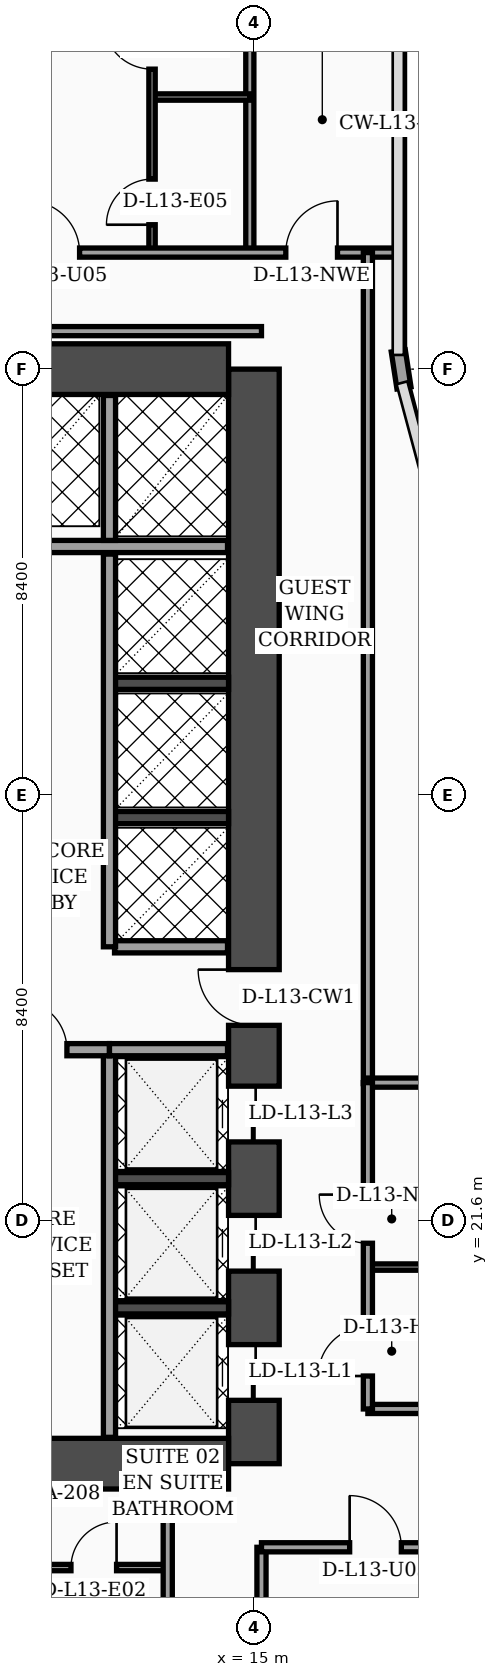
"""IFC4 building model, lengths in metres.
Left out: names, types, materials, properties, quantities, classifications, styles, units other than length and angle.
Written with IfcOpenShell. Run it as: python <this file> out.ifc"""

import sys

from ifc_helpers import new_model, si_unit, direction, frame, frame_2d, origin, place, context, subcontext, project, spatial, rectangle, extrude, element, fill, save


model = new_model("IFC4")
c1 = context("Model", 3, precision=1e-05, world=origin(), true_north=direction((0.0, 1.0)))
c2 = subcontext(c1, "Body", "Model", "MODEL_VIEW")
j1 = project(units=[si_unit("LENGTHUNIT", "METRE"), si_unit("PLANEANGLEUNIT", "RADIAN")], contexts=[c1])
p1 = place(None, origin())
s1 = spatial("IfcSite", under=j1, at=p1, CompositionType="ELEMENT")
p2 = place(p1, origin())
s2 = spatial("IfcBuilding", under=s1, at=p2, CompositionType="ELEMENT")
p3 = place(p2, frame((0.0, 0.0, 58.4)))
s3 = spatial("IfcBuildingStorey", under=s2, at=p3, CompositionType="ELEMENT", Elevation=58.4)
p4 = place(p3, frame((15.0, 16.8, 0.0), z_axis=(0.0, 0.0, 1.0), x_axis=(0.0, 1.0, 0.0)))
e1 = element("IfcWall", 1, at=p4, inside=s3, PredefinedType="SHEAR", context=c2, shape_type="SweptSolid", body=[
    extrude(rectangle(XDim=21.6, YDim=1.0, at=frame_2d((10.8, 0.0))), origin(), (0.0, 0.0, 1.0), 3.56),
])
p5 = place(p4, frame((8.65, 0.0, 0.0)))
e2 = element("IfcOpeningElement", 2, at=p5, cuts=e1, PredefinedType="OPENING", context=c2, shape_type="SweptSolid", body=[
    extrude(rectangle(XDim=1.1, YDim=2.2, at=frame_2d((0.55, 1.1))), frame((0.0, 0.51, 0.0), z_axis=(0.0, -1.0, 0.0), x_axis=(1.0, 0.0, 0.0)), (0.0, 0.0, 1.0), 1.02),
])
p6 = place(p4, frame((1.25, 0.0, 0.0)))
e3 = element("IfcOpeningElement", 3, at=p6, cuts=e1, PredefinedType="OPENING", context=c2, shape_type="SweptSolid", body=[
    extrude(rectangle(XDim=1.1, YDim=2.2, at=frame_2d((0.55, 1.1))), frame((0.0, 0.51, 0.0), z_axis=(0.0, -1.0, 0.0), x_axis=(1.0, 0.0, 0.0)), (0.0, 0.0, 1.0), 1.02),
])
p7 = place(p4, frame((3.8, 0.0, 0.0)))
e4 = element("IfcOpeningElement", 4, at=p7, cuts=e1, PredefinedType="OPENING", context=c2, shape_type="SweptSolid", body=[
    extrude(rectangle(XDim=1.1, YDim=2.2, at=frame_2d((0.55, 1.1))), frame((0.0, 0.51, 0.0), z_axis=(0.0, -1.0, 0.0), x_axis=(1.0, 0.0, 0.0)), (0.0, 0.0, 1.0), 1.02),
])
p8 = place(p4, frame((6.35, 0.0, 0.0)))
e5 = element("IfcOpeningElement", 5, at=p8, cuts=e1, PredefinedType="OPENING", context=c2, shape_type="SweptSolid", body=[
    extrude(rectangle(XDim=1.1, YDim=2.2, at=frame_2d((0.55, 1.1))), frame((0.0, 0.51, 0.0), z_axis=(0.0, -1.0, 0.0), x_axis=(1.0, 0.0, 0.0)), (0.0, 0.0, 1.0), 1.02),
])
for number, where, z_axis, x_axis in (
    (6, (4.7, 38.4, 0.0), (0.0, 0.0, 1.0), (1.0, 0.0, 0.0)),
    (7, (4.7, 16.8, 0.0), (0.0, 0.0, 1.0), (1.0, 0.0, 0.0)),
):
    element("IfcWall", number, at=place(p3, frame(where, z_axis=z_axis, x_axis=x_axis)), inside=s3, PredefinedType="SHEAR", context=c2, shape_type="SweptSolid", body=[
        extrude(rectangle(XDim=9.8, YDim=1.0, at=frame_2d((4.9, 0.0))), origin(), (0.0, 0.0, 1.0), 3.56),
    ])
for number, where, z_axis, x_axis in (
    (8, (12.18, 19.875, 0.0), (0.0, 0.0, 1.0), (1.0, 0.0, 0.0)),
    (9, (12.18, 22.425, 0.0), (0.0, 0.0, 1.0), (1.0, 0.0, 0.0)),
    (10, (12.18, 29.55, 0.0), (0.0, 0.0, 1.0), (1.0, 0.0, 0.0)),
    (11, (12.18, 32.2, 0.0), (0.0, 0.0, 1.0), (1.0, 0.0, 0.0)),
):
    element("IfcWall", number, at=place(p3, frame(where, z_axis=z_axis, x_axis=x_axis)), inside=s3, PredefinedType="SOLIDWALL", context=c2, shape_type="SweptSolid", body=[
        extrude(rectangle(XDim=2.32, YDim=0.24, at=frame_2d((1.16, 0.0))), origin(), (0.0, 0.0, 1.0), 3.56),
    ])
p9 = place(p3, frame((17.962, 38.03, 0.0), z_axis=(0.0, 0.0, 1.0), x_axis=(-0.15141125477, 0.988470855377, 0.0)))
e12 = element("IfcWall", 12, at=p9, inside=s3, PredefinedType="SOLIDWALL", context=c2, shape_type="SweptSolid", body=[
    extrude(rectangle(XDim=0.739, YDim=0.28, at=frame_2d((0.369, 0.0))), origin(), (0.0, 0.0, 1.0), 3.56),
])
p10 = place(p3, frame((12.15, 17.32, 0.0), z_axis=(0.0, 0.0, 1.0), x_axis=(0.0, 1.0, 0.0)))
e13 = element("IfcWall", 13, at=p10, inside=s3, PredefinedType="SOLIDWALL", context=c2, shape_type="SweptSolid", body=[
    extrude(rectangle(XDim=7.65, YDim=0.24, at=frame_2d((3.825, 0.0))), origin(), (0.0, 0.0, 1.0), 3.56),
])
p11 = place(p3, frame((9.68, 24.97, 0.0), z_axis=(0.0, 0.0, 1.0), x_axis=(1.0, 0.0, 0.0)))
e14 = element("IfcWall", 14, at=p11, inside=s3, PredefinedType="SOLIDWALL", context=c2, shape_type="SweptSolid", body=[
    extrude(rectangle(XDim=2.47, YDim=0.24, at=frame_2d((1.235, 0.0))), origin(), (0.0, 0.0, 1.0), 3.56),
])
p12 = place(p11, frame((0.65, 0.0, 0.0)))
e15 = element("IfcOpeningElement", 15, at=p12, cuts=e14, PredefinedType="OPENING", context=c2, shape_type="SweptSolid", body=[
    extrude(rectangle(XDim=0.98, YDim=2.15, at=frame_2d((0.49, 1.075))), frame((0.0, 0.13, 0.0), z_axis=(0.0, -1.0, 0.0), x_axis=(1.0, 0.0, 0.0)), (0.0, 0.0, 1.0), 0.26),
])
p13 = place(p3, frame((12.15, 24.97, 0.0), z_axis=(0.0, 0.0, 1.0), x_axis=(1.0, 0.0, 0.0)))
e16 = element("IfcWall", 16, at=p13, inside=s3, PredefinedType="SOLIDWALL", context=c2, shape_type="SweptSolid", body=[
    extrude(rectangle(XDim=2.33, YDim=0.24, at=frame_2d((1.165, 0.0))), origin(), (0.0, 0.0, 1.0), 2.84),
])
p14 = place(p3, frame((12.25, 27.0, 0.0), z_axis=(0.0, 0.0, 1.0), x_axis=(1.0, 0.0, 0.0)))
e17 = element("IfcWall", 17, at=p14, inside=s3, PredefinedType="SOLIDWALL", context=c2, shape_type="SweptSolid", body=[
    extrude(rectangle(XDim=2.23, YDim=0.24, at=frame_2d((1.115, 0.0))), origin(), (0.0, 0.0, 1.0), 3.56),
])
p15 = place(p3, frame((12.15, 27.0, 0.0), z_axis=(0.0, 0.0, 1.0), x_axis=(0.0, 1.0, 0.0)))
e18 = element("IfcWall", 18, at=p15, inside=s3, PredefinedType="SOLIDWALL", context=c2, shape_type="SweptSolid", body=[
    extrude(rectangle(XDim=7.75, YDim=0.24, at=frame_2d((3.875, 0.0))), origin(), (0.0, 0.0, 1.0), 3.56),
])
p16 = place(p3, frame((9.66, 34.9, 0.0), z_axis=(0.0, 0.0, 1.0), x_axis=(1.0, 0.0, 0.0)))
e19 = element("IfcWall", 19, at=p16, inside=s3, PredefinedType="SOLIDWALL", context=c2, shape_type="SweptSolid", body=[
    extrude(rectangle(XDim=4.82, YDim=0.24, at=frame_2d((2.41, 0.0))), origin(), (0.0, 0.0, 1.0), 3.56),
])
p17 = place(p3, frame((12.15, 35.02, 0.0), z_axis=(0.0, 0.0, 1.0), x_axis=(0.0, 1.0, 0.0)))
e20 = element("IfcWall", 20, at=p17, inside=s3, PredefinedType="SOLIDWALL", context=c2, shape_type="SweptSolid", body=[
    extrude(rectangle(XDim=2.86, YDim=0.24, at=frame_2d((1.43, 0.0))), origin(), (0.0, 0.0, 1.0), 3.56),
])
p18 = place(p3, frame((0.08, 14.75, 0.0), z_axis=(0.0, 0.0, 1.0), x_axis=(1.0, 0.0, 0.0)))
e21 = element("IfcWall", 21, at=p18, inside=s3, PredefinedType="PARTITIONING", context=c2, shape_type="SweptSolid", body=[
    extrude(rectangle(XDim=13.22, YDim=0.125, at=frame_2d((6.61, 0.0))), origin(), (0.0, 0.0, 1.0), 2.84),
])
p19 = place(p18, frame((4.67, 0.0, 0.0)))
e22 = element("IfcOpeningElement", 22, at=p19, cuts=e21, PredefinedType="OPENING", context=c2, shape_type="SweptSolid", body=[
    extrude(rectangle(XDim=0.96, YDim=2.2, at=frame_2d((0.48, 1.1))), frame((0.0, 0.073, 0.0), z_axis=(0.0, -1.0, 0.0), x_axis=(1.0, 0.0, 0.0)), (0.0, 0.0, 1.0), 0.145),
])
p20 = place(p18, frame((11.31, 0.0, 0.0)))
e23 = element("IfcOpeningElement", 23, at=p20, cuts=e21, PredefinedType="OPENING", context=c2, shape_type="SweptSolid", body=[
    extrude(rectangle(XDim=0.9, YDim=2.15, at=frame_2d((0.45, 1.075))), frame((0.0, 0.073, 0.0), z_axis=(0.0, -1.0, 0.0), x_axis=(1.0, 0.0, 0.0)), (0.0, 0.0, 1.0), 0.145),
])
p21 = place(p3, frame((13.3, 2.44, 0.0), z_axis=(0.0, 0.0, 1.0), x_axis=(0.0, 1.0, 0.0)))
e24 = element("IfcWall", 24, at=p21, inside=s3, PredefinedType="PARTITIONING", context=c2, shape_type="SweptSolid", body=[
    extrude(rectangle(XDim=14.36, YDim=0.18, at=frame_2d((7.18, 0.0))), origin(), (0.0, 0.0, 1.0), 3.04),
])
p22 = place(p21, frame((3.01, 0.0, 0.0)))
e25 = element("IfcOpeningElement", 25, at=p22, cuts=e24, PredefinedType="OPENING", context=c2, shape_type="SweptSolid", body=[
    extrude(rectangle(XDim=1.02, YDim=2.2, at=frame_2d((0.51, 1.1))), frame((0.0, 0.1, 0.0), z_axis=(0.0, -1.0, 0.0), x_axis=(1.0, 0.0, 0.0)), (0.0, 0.0, 1.0), 0.2),
])
p23 = place(p21, frame((9.35, 0.0, 0.0)))
e26 = element("IfcOpeningElement", 26, at=p23, cuts=e24, PredefinedType="OPENING", context=c2, shape_type="SweptSolid", body=[
    extrude(rectangle(XDim=1.02, YDim=2.2, at=frame_2d((0.51, 1.1))), frame((0.0, 0.1, 0.0), z_axis=(0.0, -1.0, 0.0), x_axis=(1.0, 0.0, 0.0)), (0.0, 0.0, 1.0), 0.2),
])
p24 = place(p3, frame((15.15, 2.44, 0.0), z_axis=(0.0, 0.0, 1.0), x_axis=(0.0, 1.0, 0.0)))
e27 = element("IfcWall", 27, at=p24, inside=s3, PredefinedType="PARTITIONING", context=c2, shape_type="SweptSolid", body=[
    extrude(rectangle(XDim=12.71, YDim=0.18, at=frame_2d((6.355, 0.0))), origin(), (0.0, 0.0, 1.0), 3.04),
])
p25 = place(p3, frame((15.15, 15.15, 0.0), z_axis=(0.0, 0.0, 1.0), x_axis=(1.0, 0.0, 0.0)))
e28 = element("IfcWall", 28, at=p25, inside=s3, PredefinedType="PARTITIONING", context=c2, shape_type="SweptSolid", body=[
    extrude(rectangle(XDim=6.45, YDim=0.18, at=frame_2d((3.225, 0.0))), origin(), (0.0, 0.0, 1.0), 2.34),
])
p26 = place(p25, frame((1.74, 0.0, 0.0)))
e29 = element("IfcOpeningElement", 29, at=p26, cuts=e28, PredefinedType="OPENING", context=c2, shape_type="SweptSolid", body=[
    extrude(rectangle(XDim=1.02, YDim=2.2, at=frame_2d((0.51, 1.1))), frame((0.0, 0.1, 0.0), z_axis=(0.0, -1.0, 0.0), x_axis=(1.0, 0.0, 0.0)), (0.0, 0.0, 1.0), 0.2),
])
p27 = place(p3, frame((14.92, 40.7, 0.0), z_axis=(0.0, 0.0, 1.0), x_axis=(0.0, 1.0, 0.0)))
e30 = element("IfcWall", 30, at=p27, inside=s3, PredefinedType="PARTITIONING", context=c2, shape_type="SweptSolid", body=[
    extrude(rectangle(XDim=7.1, YDim=0.16, at=frame_2d((3.55, 0.0))), origin(), (0.0, 0.0, 1.0), 3.04),
])
p28 = place(p3, frame((12.99, 43.77, 0.0), z_axis=(0.0, 0.0, 1.0), x_axis=(1.0, 0.0, 0.0)))
e31 = element("IfcWall", 31, at=p28, inside=s3, PredefinedType="PARTITIONING", context=c2, shape_type="SweptSolid", body=[
    extrude(rectangle(XDim=1.93, YDim=0.125, at=frame_2d((0.965, 0.0))), origin(), (0.0, 0.0, 1.0), 3.56),
])
p29 = place(p3, frame((12.99, 40.7, 0.0), z_axis=(0.0, 0.0, 1.0), x_axis=(0.0, 1.0, 0.0)))
e32 = element("IfcWall", 32, at=p29, inside=s3, PredefinedType="PARTITIONING", context=c2, shape_type="SweptSolid", body=[
    extrude(rectangle(XDim=10.24, YDim=0.125, at=frame_2d((5.12, 0.0))), origin(), (0.0, 0.0, 1.0), 3.04),
])
p30 = place(p29, frame((0.55, 0.0, 0.0)))
e33 = element("IfcOpeningElement", 33, at=p30, cuts=e32, PredefinedType="OPENING", context=c2, shape_type="SweptSolid", body=[
    extrude(rectangle(XDim=0.9, YDim=2.15, at=frame_2d((0.45, 1.075))), frame((0.0, 0.073, 0.0), z_axis=(0.0, -1.0, 0.0), x_axis=(1.0, 0.0, 0.0)), (0.0, 0.0, 1.0), 0.145),
])
p31 = place(p29, frame((3.62, 0.0, 0.0)))
e34 = element("IfcOpeningElement", 34, at=p31, cuts=e32, PredefinedType="OPENING", context=c2, shape_type="SweptSolid", body=[
    extrude(rectangle(XDim=0.96, YDim=2.2, at=frame_2d((0.48, 1.1))), frame((0.0, 0.073, 0.0), z_axis=(0.0, -1.0, 0.0), x_axis=(1.0, 0.0, 0.0)), (0.0, 0.0, 1.0), 0.145),
])
p32 = place(p3, frame((0.08, 40.7, 0.0), z_axis=(0.0, 0.0, 1.0), x_axis=(1.0, 0.0, 0.0)))
e35 = element("IfcWall", 35, at=p32, inside=s3, PredefinedType="PARTITIONING", context=c2, shape_type="SweptSolid", body=[
    extrude(rectangle(XDim=17.77, YDim=0.18, at=frame_2d((8.885, 0.0))), origin(), (0.0, 0.0, 1.0), 2.84),
])
p33 = place(p32, frame((0.9, 0.0, 0.0)))
e36 = element("IfcOpeningElement", 36, at=p33, cuts=e35, PredefinedType="OPENING", context=c2, shape_type="SweptSolid", body=[
    extrude(rectangle(XDim=1.02, YDim=2.2, at=frame_2d((0.51, 1.1))), frame((0.0, 0.1, 0.0), z_axis=(0.0, -1.0, 0.0), x_axis=(1.0, 0.0, 0.0)), (0.0, 0.0, 1.0), 0.2),
])
p34 = place(p32, frame((4.57, 0.0, 0.0)))
e37 = element("IfcOpeningElement", 37, at=p34, cuts=e35, PredefinedType="OPENING", context=c2, shape_type="SweptSolid", body=[
    extrude(rectangle(XDim=1.02, YDim=2.2, at=frame_2d((0.51, 1.1))), frame((0.0, 0.1, 0.0), z_axis=(0.0, -1.0, 0.0), x_axis=(1.0, 0.0, 0.0)), (0.0, 0.0, 1.0), 0.2),
])
p35 = place(p32, frame((10.46, 0.0, 0.0)))
e38 = element("IfcOpeningElement", 38, at=p35, cuts=e35, PredefinedType="OPENING", context=c2, shape_type="SweptSolid", body=[
    extrude(rectangle(XDim=1.02, YDim=2.2, at=frame_2d((0.51, 1.1))), frame((0.0, 0.1, 0.0), z_axis=(0.0, -1.0, 0.0), x_axis=(1.0, 0.0, 0.0)), (0.0, 0.0, 1.0), 0.2),
])
p36 = place(p32, frame((15.55, 0.0, 0.0)))
e39 = element("IfcOpeningElement", 39, at=p36, cuts=e35, PredefinedType="OPENING", context=c2, shape_type="SweptSolid", body=[
    extrude(rectangle(XDim=1.02, YDim=2.2, at=frame_2d((0.51, 1.1))), frame((0.0, 0.1, 0.0), z_axis=(0.0, -1.0, 0.0), x_axis=(1.0, 0.0, 0.0)), (0.0, 0.0, 1.0), 0.2),
])
p37 = place(p3, frame((17.25, 24.3, 0.0), z_axis=(0.0, 0.0, 1.0), x_axis=(0.0, 1.0, 0.0)))
e40 = element("IfcWall", 40, at=p37, inside=s3, PredefinedType="PARTITIONING", context=c2, shape_type="SweptSolid", body=[
    extrude(rectangle(XDim=16.4, YDim=0.18, at=frame_2d((8.2, 0.0))), origin(), (0.0, 0.0, 1.0), 2.84),
])
p38 = place(p3, frame((3.68, 39.15, 0.0), z_axis=(0.0, 0.0, 1.0), x_axis=(1.0, 0.0, 0.0)))
e41 = element("IfcWall", 41, at=p38, inside=s3, PredefinedType="PARTITIONING", context=c2, shape_type="SweptSolid", body=[
    extrude(rectangle(XDim=11.47, YDim=0.18, at=frame_2d((5.735, 0.0))), origin(), (0.0, 0.0, 1.0), 2.84),
])
p39 = place(p3, frame((17.25, 17.88, 0.0), z_axis=(0.0, 0.0, 1.0), x_axis=(1.0, 0.0, 0.0)))
e42 = element("IfcWall", 42, at=p39, inside=s3, PredefinedType="PARTITIONING", context=c2, shape_type="SweptSolid", body=[
    extrude(rectangle(XDim=4.3, YDim=0.18, at=frame_2d((2.15, 0.0))), origin(), (0.0, 0.0, 1.0), 3.09),
])
p40 = place(p3, frame((17.25, 20.68, 0.0), z_axis=(0.0, 0.0, 1.0), x_axis=(1.0, 0.0, 0.0)))
e43 = element("IfcWall", 43, at=p40, inside=s3, PredefinedType="PARTITIONING", context=c2, shape_type="SweptSolid", body=[
    extrude(rectangle(XDim=4.3, YDim=0.125, at=frame_2d((2.15, 0.0))), origin(), (0.0, 0.0, 1.0), 3.56),
])
p41 = place(p3, frame((17.25, 24.32, 0.0), z_axis=(0.0, 0.0, 1.0), x_axis=(1.0, 0.0, 0.0)))
e44 = element("IfcWall", 44, at=p41, inside=s3, PredefinedType="PARTITIONING", context=c2, shape_type="SweptSolid", body=[
    extrude(rectangle(XDim=4.35, YDim=0.18, at=frame_2d((2.175, 0.0))), origin(), (0.0, 0.0, 1.0), 3.56),
])
p42 = place(p3, frame((17.25, 17.88, 0.0), z_axis=(0.0, 0.0, 1.0), x_axis=(0.0, 1.0, 0.0)))
e45 = element("IfcWall", 45, at=p42, inside=s3, PredefinedType="PARTITIONING", context=c2, shape_type="SweptSolid", body=[
    extrude(rectangle(XDim=6.44, YDim=0.18, at=frame_2d((3.22, 0.0))), origin(), (0.0, 0.0, 1.0), 3.09),
])
p43 = place(p42, frame((0.65, 0.0, 0.0)))
e46 = element("IfcOpeningElement", 46, at=p43, cuts=e45, PredefinedType="OPENING", context=c2, shape_type="SweptSolid", body=[
    extrude(rectangle(XDim=0.98, YDim=2.15, at=frame_2d((0.49, 1.075))), frame((0.0, 0.1, 0.0), z_axis=(0.0, -1.0, 0.0), x_axis=(1.0, 0.0, 0.0)), (0.0, 0.0, 1.0), 0.2),
])
p44 = place(p42, frame((3.27, 0.0, 0.0)))
e47 = element("IfcOpeningElement", 47, at=p44, cuts=e45, PredefinedType="OPENING", context=c2, shape_type="SweptSolid", body=[
    extrude(rectangle(XDim=0.96, YDim=2.2, at=frame_2d((0.48, 1.1))), frame((0.0, 0.1, 0.0), z_axis=(0.0, -1.0, 0.0), x_axis=(1.0, 0.0, 0.0)), (0.0, 0.0, 1.0), 0.2),
])
p45 = place(p12, origin())
e48 = element("IfcDoor", 48, at=p45, inside=s3, OperationType="SINGLE_SWING_LEFT", PredefinedType="DOOR", context=c2, shape_type="SweptSolid", body=[
    extrude(rectangle(XDim=0.98, YDim=2.15, at=frame_2d((0.49, 1.075))), frame((0.0, 0.025, 0.0), z_axis=(0.0, -1.0, 0.0), x_axis=(1.0, 0.0, 0.0)), (0.0, 0.0, 1.0), 0.05),
])
fill(e15, e48)
p46 = place(p20, origin())
e49 = element("IfcDoor", 49, at=p46, inside=s3, OperationType="SINGLE_SWING_RIGHT", PredefinedType="DOOR", context=c2, shape_type="SweptSolid", body=[
    extrude(rectangle(XDim=0.9, YDim=2.15, at=frame_2d((0.45, 1.075))), frame((0.0, 0.025, 0.0), z_axis=(0.0, -1.0, 0.0), x_axis=(1.0, 0.0, 0.0)), (0.0, 0.0, 1.0), 0.05),
])
fill(e23, e49)
p47 = place(p26, origin())
e50 = element("IfcDoor", 50, at=p47, inside=s3, OperationType="SINGLE_SWING_LEFT", PredefinedType="DOOR", context=c2, shape_type="SweptSolid", body=[
    extrude(rectangle(XDim=1.02, YDim=2.2, at=frame_2d((0.51, 1.1))), frame((0.0, 0.025, 0.0), z_axis=(0.0, -1.0, 0.0), x_axis=(1.0, 0.0, 0.0)), (0.0, 0.0, 1.0), 0.05),
])
fill(e29, e50)
p48 = place(p30, origin())
e51 = element("IfcDoor", 51, at=p48, inside=s3, OperationType="SINGLE_SWING_LEFT", PredefinedType="DOOR", context=c2, shape_type="SweptSolid", body=[
    extrude(rectangle(XDim=0.9, YDim=2.15, at=frame_2d((0.45, 1.075))), frame((0.0, 0.025, 0.0), z_axis=(0.0, -1.0, 0.0), x_axis=(1.0, 0.0, 0.0)), (0.0, 0.0, 1.0), 0.05),
])
fill(e33, e51)
p49 = place(p31, origin())
e52 = element("IfcDoor", 52, at=p49, inside=s3, OperationType="SINGLE_SWING_RIGHT", PredefinedType="DOOR", context=c2, shape_type="SweptSolid", body=[
    extrude(rectangle(XDim=0.96, YDim=2.2, at=frame_2d((0.48, 1.1))), frame((0.0, 0.025, 0.0), z_axis=(0.0, -1.0, 0.0), x_axis=(1.0, 0.0, 0.0)), (0.0, 0.0, 1.0), 0.05),
])
fill(e34, e52)
p50 = place(p35, origin())
e53 = element("IfcDoor", 53, at=p50, inside=s3, OperationType="SINGLE_SWING_LEFT", PredefinedType="DOOR", context=c2, shape_type="SweptSolid", body=[
    extrude(rectangle(XDim=1.02, YDim=2.2, at=frame_2d((0.51, 1.1))), frame((0.0, 0.025, 0.0), z_axis=(0.0, -1.0, 0.0), x_axis=(1.0, 0.0, 0.0)), (0.0, 0.0, 1.0), 0.05),
])
fill(e38, e53)
p51 = place(p36, origin())
e54 = element("IfcDoor", 54, at=p51, inside=s3, OperationType="SINGLE_SWING_RIGHT", PredefinedType="DOOR", context=c2, shape_type="SweptSolid", body=[
    extrude(rectangle(XDim=1.02, YDim=2.2, at=frame_2d((0.51, 1.1))), frame((0.0, 0.025, 0.0), z_axis=(0.0, -1.0, 0.0), x_axis=(1.0, 0.0, 0.0)), (0.0, 0.0, 1.0), 0.05),
])
fill(e39, e54)
p52 = place(p43, origin())
e55 = element("IfcDoor", 55, at=p52, inside=s3, OperationType="SINGLE_SWING_LEFT", PredefinedType="DOOR", context=c2, shape_type="SweptSolid", body=[
    extrude(rectangle(XDim=0.98, YDim=2.15, at=frame_2d((0.49, 1.075))), frame((0.0, 0.025, 0.0), z_axis=(0.0, -1.0, 0.0), x_axis=(1.0, 0.0, 0.0)), (0.0, 0.0, 1.0), 0.05),
])
fill(e46, e55)
p53 = place(p44, origin())
e56 = element("IfcDoor", 56, at=p53, inside=s3, OperationType="SINGLE_SWING_RIGHT", PredefinedType="DOOR", context=c2, shape_type="SweptSolid", body=[
    extrude(rectangle(XDim=0.96, YDim=2.2, at=frame_2d((0.48, 1.1))), frame((0.0, 0.025, 0.0), z_axis=(0.0, -1.0, 0.0), x_axis=(1.0, 0.0, 0.0)), (0.0, 0.0, 1.0), 0.05),
])
fill(e47, e56)
p54 = place(p5, origin())
e57 = element("IfcDoor", 57, at=p54, inside=s3, OperationType="SINGLE_SWING_RIGHT", PredefinedType="DOOR", context=c2, shape_type="SweptSolid", body=[
    extrude(rectangle(XDim=1.1, YDim=2.2, at=frame_2d((0.55, 1.1))), frame((0.0, 0.025, 0.0), z_axis=(0.0, -1.0, 0.0), x_axis=(1.0, 0.0, 0.0)), (0.0, 0.0, 1.0), 0.05),
])
fill(e2, e57)
p55 = place(p6, origin())
e58 = element("IfcDoor", 58, at=p55, inside=s3, OperationType="DOUBLE_DOOR_SLIDING", PredefinedType="DOOR", context=c2, shape_type="SweptSolid", body=[
    extrude(rectangle(XDim=1.1, YDim=2.2, at=frame_2d((0.55, 1.1))), frame((0.0, 0.025, 0.0), z_axis=(0.0, -1.0, 0.0), x_axis=(1.0, 0.0, 0.0)), (0.0, 0.0, 1.0), 0.05),
])
fill(e3, e58)
p56 = place(p7, origin())
e59 = element("IfcDoor", 59, at=p56, inside=s3, OperationType="DOUBLE_DOOR_SLIDING", PredefinedType="DOOR", context=c2, shape_type="SweptSolid", body=[
    extrude(rectangle(XDim=1.1, YDim=2.2, at=frame_2d((0.55, 1.1))), frame((0.0, 0.025, 0.0), z_axis=(0.0, -1.0, 0.0), x_axis=(1.0, 0.0, 0.0)), (0.0, 0.0, 1.0), 0.05),
])
fill(e4, e59)
p57 = place(p8, origin())
e60 = element("IfcDoor", 60, at=p57, inside=s3, OperationType="DOUBLE_DOOR_SLIDING", PredefinedType="DOOR", context=c2, shape_type="SweptSolid", body=[
    extrude(rectangle(XDim=1.1, YDim=2.2, at=frame_2d((0.55, 1.1))), frame((0.0, 0.025, 0.0), z_axis=(0.0, -1.0, 0.0), x_axis=(1.0, 0.0, 0.0)), (0.0, 0.0, 1.0), 0.05),
])
fill(e5, e60)
save(model, sys.argv[1])
